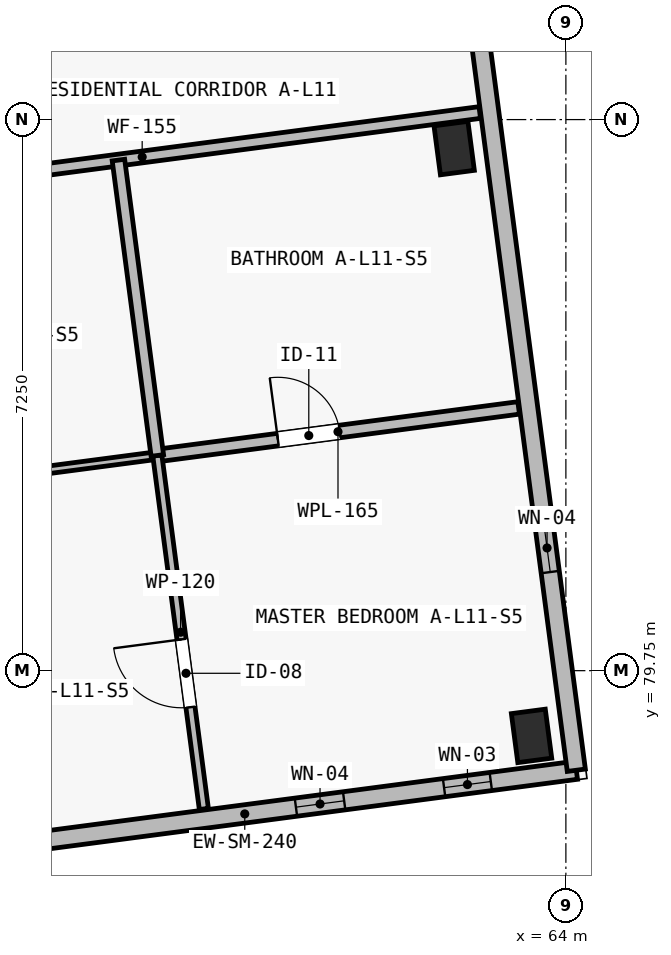
"""IFC4 building model, lengths in metres.
Left out: names, types, materials, properties, quantities, classifications, styles, units other than length and angle.
Written with IfcOpenShell. Run it as: python <this file> out.ifc"""

import sys

from ifc_helpers import new_model, si_unit, direction, frame, frame_2d, origin, origin_2d, place, context, subcontext, project, spatial, polyline, rectangle, outline, extrude, element, fill, save


model = new_model("IFC4")
c1 = context("Model", 3, precision=1e-05, world=origin(), true_north=direction((0.0, 1.0)))
c2 = subcontext(c1, "Body", "Model", "MODEL_VIEW")
j1 = project(units=[si_unit("LENGTHUNIT", "METRE"), si_unit("PLANEANGLEUNIT", "RADIAN")], contexts=[c1])
p1 = place(None, origin())
s1 = spatial("IfcSite", under=j1, at=p1, CompositionType="ELEMENT")
p2 = place(p1, origin())
s2 = spatial("IfcBuilding", under=s1, at=p2, CompositionType="ELEMENT")
p3 = place(p2, frame((0.0, 0.0, 37.65)))
s3 = spatial("IfcBuildingStorey", under=s2, at=p3, CompositionType="ELEMENT", Elevation=37.65)
for number, where, z_axis, x_axis in (
    (1, (63.548, 78.892, 0.0), (0.0, 0.0, 1.0), (0.991, 0.131, 0.0)),
    (2, (62.53, 86.625, 0.0), (0.0, 0.0, 1.0), (0.991, 0.131, 0.0)),
):
    element("IfcColumn", number, at=place(p3, frame(where, z_axis=z_axis, x_axis=x_axis)), inside=s3, PredefinedType="COLUMN", context=c2, shape_type="SweptSolid", body=[
        extrude(rectangle(XDim=0.45, YDim=0.65, at=origin_2d()), origin(), (0.0, 0.0, 1.0), 4.587),
    ])
p4 = place(p3, frame((64.137, 78.44, 0.0), z_axis=(0.0, 0.0, 1.0), x_axis=(-0.991447495205, -0.130506184728, 0.0)))
e3 = element("IfcWall", 3, at=p4, inside=s3, PredefinedType="SOLIDWALL", context=c2, shape_type="SweptSolid", body=[
    extrude(outline(polyline([(0.0, 0.0), (8.8, 0.0), (8.8, 6.573), (0.0, 5.083), (0.0, 0.0)])), frame((0.0, 0.12, 0.0), z_axis=(0.0, -1.0, 0.0), x_axis=(1.0, 0.0, 0.0)), (0.0, 0.0, 1.0), 0.24),
])
p5 = place(p4, frame((1.135, 0.0, 0.48)))
e4 = element("IfcOpeningElement", 4, at=p5, cuts=e3, PredefinedType="OPENING", context=c2, shape_type="SweptSolid", body=[
    extrude(rectangle(XDim=0.62, YDim=2.28, at=frame_2d((0.31, 1.14))), frame((0.0, 0.135, 0.0), z_axis=(0.0, -1.0, 0.0), x_axis=(1.0, 0.0, 0.0)), (0.0, 0.0, 1.0), 0.27),
])
p6 = place(p4, frame((3.081, 0.0, 0.52)))
e5 = element("IfcOpeningElement", 5, at=p6, cuts=e3, PredefinedType="OPENING", context=c2, shape_type="SweptSolid", body=[
    extrude(rectangle(XDim=0.64, YDim=2.18, at=frame_2d((0.32, 1.09))), frame((0.0, 0.135, 0.0), z_axis=(0.0, -1.0, 0.0), x_axis=(1.0, 0.0, 0.0)), (0.0, 0.0, 1.0), 0.27),
])
p7 = place(p4, frame((7.73, 0.0, 0.48)))
e6 = element("IfcOpeningElement", 6, at=p7, cuts=e3, PredefinedType="OPENING", context=c2, shape_type="SweptSolid", body=[
    extrude(rectangle(XDim=0.68, YDim=2.24, at=frame_2d((0.34, 1.12))), frame((0.0, 0.135, 0.0), z_axis=(0.0, -1.0, 0.0), x_axis=(1.0, 0.0, 0.0)), (0.0, 0.0, 1.0), 0.27),
])
p8 = place(p3, frame((61.39, 99.31, 0.0), z_axis=(0.0, 0.0, 1.0), x_axis=(0.13052411616, -0.99144513469, 0.0)))
e7 = element("IfcWall", 7, at=p8, inside=s3, PredefinedType="SOLIDWALL", context=c2, shape_type="SweptSolid", body=[
    extrude(rectangle(XDim=21.05, YDim=0.24, at=frame_2d((10.525, 0.0))), origin(), (0.0, 0.0, 1.0), 5.083),
])
p9 = place(p8, frame((2.99, 0.0, 0.52)))
e8 = element("IfcOpeningElement", 8, at=p9, cuts=e7, PredefinedType="OPENING", context=c2, shape_type="SweptSolid", body=[
    extrude(rectangle(XDim=0.8, YDim=2.3, at=frame_2d((0.4, 1.15))), frame((0.0, 0.135, 0.0), z_axis=(0.0, -1.0, 0.0), x_axis=(1.0, 0.0, 0.0)), (0.0, 0.0, 1.0), 0.27),
])
p10 = place(p8, frame((17.78, 0.0, 0.45)))
e9 = element("IfcOpeningElement", 9, at=p10, cuts=e7, PredefinedType="OPENING", context=c2, shape_type="SweptSolid", body=[
    extrude(rectangle(XDim=0.64, YDim=2.18, at=frame_2d((0.32, 1.09))), frame((0.0, 0.135, 0.0), z_axis=(0.0, -1.0, 0.0), x_axis=(1.0, 0.0, 0.0)), (0.0, 0.0, 1.0), 0.27),
])
p11 = place(p3, frame((53.984, 85.924, 0.0), z_axis=(0.0, 0.0, 1.0), x_axis=(0.991445946609, 0.130517948779, 0.0)))
e10 = element("IfcWall", 10, at=p11, inside=s3, PredefinedType="PARTITIONING", context=c2, shape_type="SweptSolid", body=[
    extrude(rectangle(XDim=8.96, YDim=0.155, at=frame_2d((4.48, 0.0))), origin(), (0.0, 0.0, 1.0), 2.97),
])
p12 = place(p11, frame((1.655, 0.0, 0.0)))
e11 = element("IfcOpeningElement", 11, at=p12, cuts=e10, PredefinedType="OPENING", context=c2, shape_type="SweptSolid", body=[
    extrude(rectangle(XDim=0.98, YDim=2.15, at=frame_2d((0.49, 1.075))), frame((0.0, 0.093, 0.0), z_axis=(0.0, -1.0, 0.0), x_axis=(1.0, 0.0, 0.0)), (0.0, 0.0, 1.0), 0.185),
])
p13 = place(p3, frame((54.376, 82.021, 0.0), z_axis=(0.0, 0.0, 1.0), x_axis=(0.991452356241, 0.130469250419, 0.0)))
e12 = element("IfcWall", 12, at=p13, inside=s3, PredefinedType="PARTITIONING", context=c2, shape_type="SweptSolid", body=[
    extrude(rectangle(XDim=4.285, YDim=0.1, at=frame_2d((2.143, 0.0))), origin(), (0.0, 0.0, 1.0), 2.97),
])
p14 = place(p13, frame((1.825, 0.0, 0.0)))
e13 = element("IfcOpeningElement", 13, at=p14, cuts=e12, PredefinedType="OPENING", context=c2, shape_type="SweptSolid", body=[
    extrude(rectangle(XDim=0.88, YDim=2.1, at=frame_2d((0.44, 1.05))), frame((0.0, 0.065, 0.0), z_axis=(0.0, -1.0, 0.0), x_axis=(1.0, 0.0, 0.0)), (0.0, 0.0, 1.0), 0.13),
])
p15 = place(p3, frame((58.625, 82.581, 0.0), z_axis=(0.0, 0.0, 1.0), x_axis=(0.991441813226, 0.130549343114, 0.0)))
e14 = element("IfcWall", 14, at=p15, inside=s3, PredefinedType="PLUMBINGWALL", context=c2, shape_type="SweptSolid", body=[
    extrude(rectangle(XDim=4.795, YDim=0.165, at=frame_2d((2.397, 0.0))), origin(), (0.0, 0.0, 1.0), 2.97),
])
p16 = place(p15, frame((1.6, 0.0, 0.0)))
e15 = element("IfcOpeningElement", 15, at=p16, cuts=e14, PredefinedType="OPENING", context=c2, shape_type="SweptSolid", body=[
    extrude(rectangle(XDim=0.82, YDim=2.08, at=frame_2d((0.41, 1.04))), frame((0.0, 0.097, 0.0), z_axis=(0.0, -1.0, 0.0), x_axis=(1.0, 0.0, 0.0)), (0.0, 0.0, 1.0), 0.195),
])
p17 = place(p3, frame((59.237, 77.931, 0.0), z_axis=(0.0, 0.0, 1.0), x_axis=(-0.13050972446, 0.991447029256, 0.0)))
e16 = element("IfcWall", 16, at=p17, inside=s3, PredefinedType="PARTITIONING", context=c2, shape_type="SweptSolid", body=[
    extrude(rectangle(XDim=4.69, YDim=0.12, at=frame_2d((2.345, 0.0))), origin(), (0.0, 0.0, 1.0), 2.97),
])
p18 = place(p17, frame((1.35, 0.0, 0.0)))
e17 = element("IfcOpeningElement", 17, at=p18, cuts=e16, PredefinedType="OPENING", context=c2, shape_type="SweptSolid", body=[
    extrude(rectangle(XDim=0.9, YDim=2.1, at=frame_2d((0.45, 1.05))), frame((0.0, 0.075, 0.0), z_axis=(0.0, -1.0, 0.0), x_axis=(1.0, 0.0, 0.0)), (0.0, 0.0, 1.0), 0.15),
])
p19 = place(p3, frame((58.625, 82.581, 0.0), z_axis=(0.0, 0.0, 1.0), x_axis=(-0.130539898676, 0.991443056788, 0.0)))
e18 = element("IfcWall", 18, at=p19, inside=s3, PredefinedType="PLUMBINGWALL", context=c2, shape_type="SweptSolid", body=[
    extrude(rectangle(XDim=3.92, YDim=0.165, at=frame_2d((1.96, 0.0))), origin(), (0.0, 0.0, 1.0), 2.97),
])
p20 = place(p5, origin())
e19 = element("IfcWindow", 19, at=p20, inside=s3, PartitioningType="SINGLE_PANEL", PredefinedType="WINDOW", context=c2, shape_type="SweptSolid", body=[
    extrude(rectangle(XDim=0.62, YDim=2.28, at=frame_2d((0.31, 1.14))), frame((0.0, 0.03, 0.0), z_axis=(0.0, -1.0, 0.0), x_axis=(1.0, 0.0, 0.0)), (0.0, 0.0, 1.0), 0.06),
])
fill(e4, e19)
p21 = place(p6, origin())
e20 = element("IfcWindow", 20, at=p21, inside=s3, PartitioningType="SINGLE_PANEL", PredefinedType="WINDOW", context=c2, shape_type="SweptSolid", body=[
    extrude(rectangle(XDim=0.64, YDim=2.18, at=frame_2d((0.32, 1.09))), frame((0.0, 0.03, 0.0), z_axis=(0.0, -1.0, 0.0), x_axis=(1.0, 0.0, 0.0)), (0.0, 0.0, 1.0), 0.06),
])
fill(e5, e20)
p22 = place(p10, origin())
e21 = element("IfcWindow", 21, at=p22, inside=s3, PartitioningType="SINGLE_PANEL", PredefinedType="WINDOW", context=c2, shape_type="SweptSolid", body=[
    extrude(rectangle(XDim=0.64, YDim=2.18, at=frame_2d((0.32, 1.09))), frame((0.0, 0.03, 0.0), z_axis=(0.0, -1.0, 0.0), x_axis=(1.0, 0.0, 0.0)), (0.0, 0.0, 1.0), 0.06),
])
fill(e9, e21)
p23 = place(p16, origin())
e22 = element("IfcDoor", 22, at=p23, inside=s3, OperationType="SINGLE_SWING_LEFT", PredefinedType="DOOR", context=c2, shape_type="SweptSolid", body=[
    extrude(rectangle(XDim=0.82, YDim=2.08, at=frame_2d((0.41, 1.04))), frame((0.0, 0.025, 0.0), z_axis=(0.0, -1.0, 0.0), x_axis=(1.0, 0.0, 0.0)), (0.0, 0.0, 1.0), 0.05),
])
fill(e15, e22)
p24 = place(p18, origin())
e23 = element("IfcDoor", 23, at=p24, inside=s3, OperationType="SINGLE_SWING_RIGHT", PredefinedType="DOOR", context=c2, shape_type="SweptSolid", body=[
    extrude(rectangle(XDim=0.9, YDim=2.1, at=frame_2d((0.45, 1.05))), frame((0.0, 0.025, 0.0), z_axis=(0.0, -1.0, 0.0), x_axis=(1.0, 0.0, 0.0)), (0.0, 0.0, 1.0), 0.05),
])
fill(e17, e23)
save(model, sys.argv[1])
